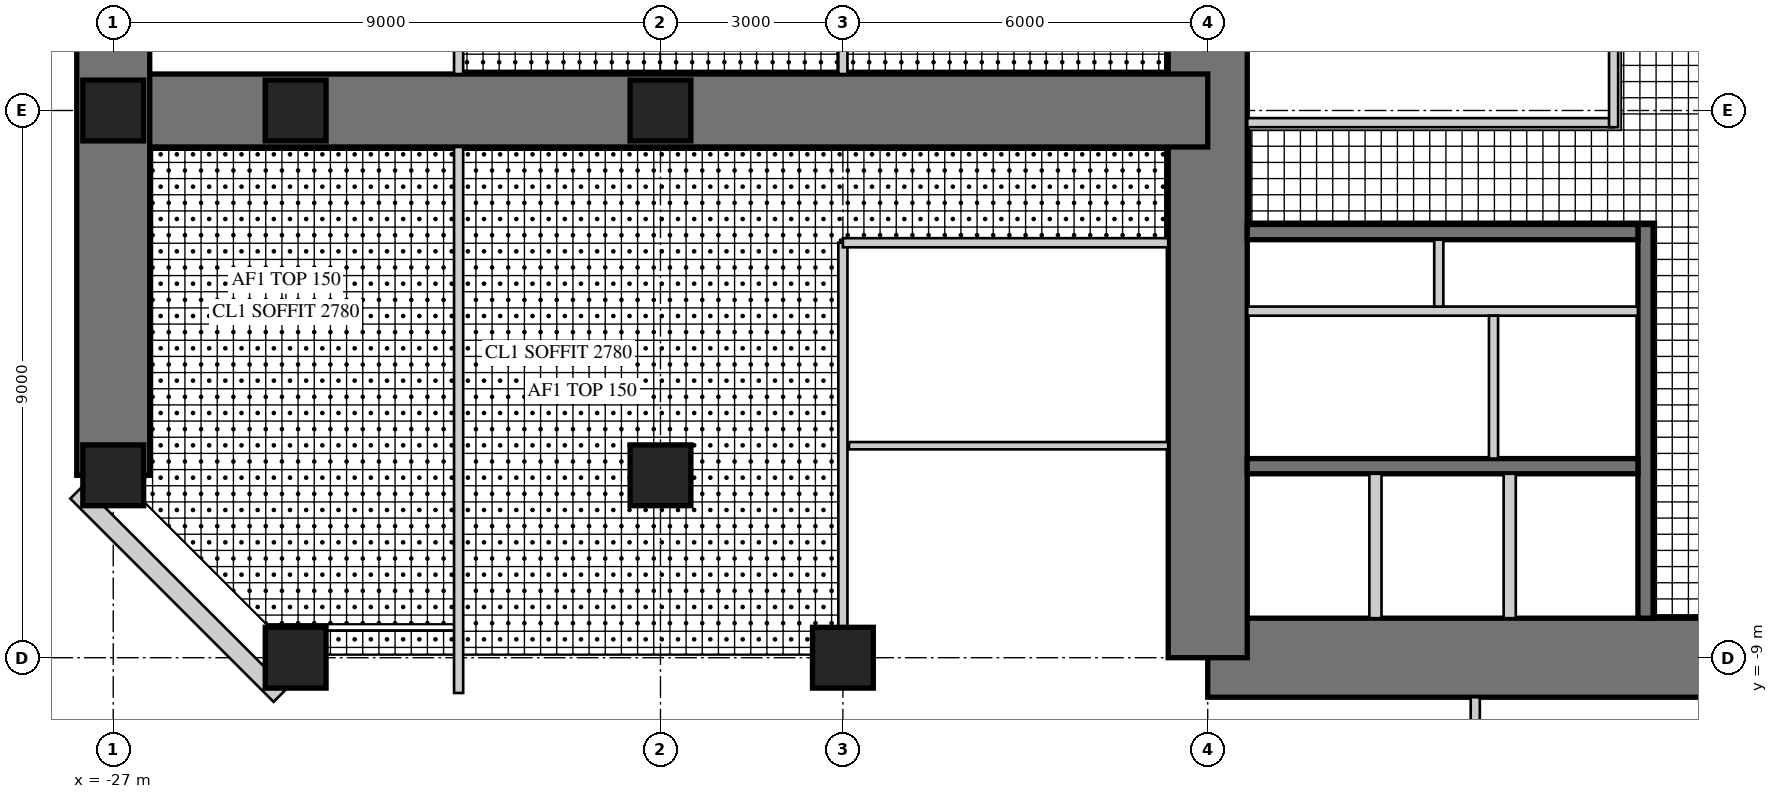
"""IFC4 building model, lengths in metres.
Left out: names, types, materials, properties, quantities, classifications, styles, units other than length and angle.
Written with IfcOpenShell. Run it as: python <this file> out.ifc"""

import sys

from ifc_helpers import new_model, si_unit, direction, frame, frame_2d, origin, origin_2d, place, context, subcontext, project, spatial, rectangle, hollow_rectangle, extrude, element, fill, save


model = new_model("IFC4")
c1 = context("Model", 3, precision=1e-05, world=origin(), true_north=direction((0.0, 1.0)))
c2 = subcontext(c1, "Body", "Model", "MODEL_VIEW")
j1 = project(units=[si_unit("LENGTHUNIT", "METRE"), si_unit("PLANEANGLEUNIT", "RADIAN")], contexts=[c1])
p1 = place(None, origin())
s1 = spatial("IfcSite", under=j1, at=p1, CompositionType="ELEMENT")
p2 = place(p1, origin())
s2 = spatial("IfcBuilding", under=s1, at=p2, CompositionType="ELEMENT")
p3 = place(p2, frame((0.0, 0.0, 152.5)))
s3 = spatial("IfcBuildingStorey", under=s2, at=p3, CompositionType="ELEMENT", Elevation=152.5)
p4 = place(p3, frame((-9.0, -9.0, 0.0), z_axis=(0.0, 0.0, 1.0), x_axis=(1.0, 0.0, 0.0)))
e1 = element("IfcWall", 1, at=p4, inside=s3, PredefinedType="SHEAR", context=c2, shape_type="SweptSolid", body=[
    extrude(rectangle(XDim=18.0, YDim=1.3, at=frame_2d((9.0, 0.0))), origin(), (0.0, 0.0, 1.0), 4.0),
])
p5 = place(p4, frame((9.8, 0.0, 0.0)))
e2 = element("IfcOpeningElement", 2, at=p5, cuts=e1, PredefinedType="OPENING", context=c2, shape_type="SweptSolid", body=[
    extrude(rectangle(XDim=1.0, YDim=2.4, at=frame_2d((0.5, 1.2))), frame((0.0, 0.66, 0.0), z_axis=(0.0, -1.0, 0.0), x_axis=(1.0, 0.0, 0.0)), (0.0, 0.0, 1.0), 1.32),
])
p6 = place(p3, frame((-9.0, 9.0, 0.0), z_axis=(0.0, 0.0, 1.0), x_axis=(0.0, -1.0, 0.0)))
e3 = element("IfcWall", 3, at=p6, inside=s3, PredefinedType="SHEAR", context=c2, shape_type="SweptSolid", body=[
    extrude(rectangle(XDim=18.0, YDim=1.3, at=frame_2d((9.0, 0.0))), origin(), (0.0, 0.0, 1.0), 4.0),
])
p7 = place(p6, frame((9.8, 0.0, 0.0)))
e4 = element("IfcOpeningElement", 4, at=p7, cuts=e3, PredefinedType="OPENING", context=c2, shape_type="SweptSolid", body=[
    extrude(rectangle(XDim=1.0, YDim=2.4, at=frame_2d((0.5, 1.2))), frame((0.0, 0.66, 0.0), z_axis=(0.0, -1.0, 0.0), x_axis=(1.0, 0.0, 0.0)), (0.0, 0.0, 1.0), 1.32),
])
p8 = place(p3, frame((-1.8, -1.875, 0.0), z_axis=(0.0, 0.0, 1.0), x_axis=(0.0, -1.0, 0.0)))
e5 = element("IfcWall", 5, at=p8, inside=s3, PredefinedType="SHEAR", context=c2, shape_type="SweptSolid", body=[
    extrude(rectangle(XDim=6.475, YDim=0.25, at=frame_2d((3.238, 0.0))), origin(), (0.0, 0.0, 1.0), 4.0),
])
p9 = place(p8, frame((1.875, 0.0, 0.0)))
e6 = element("IfcOpeningElement", 6, at=p9, cuts=e5, PredefinedType="OPENING", context=c2, shape_type="SweptSolid", body=[
    extrude(rectangle(XDim=1.6, YDim=2.4, at=frame_2d((0.8, 1.2))), frame((0.0, 0.135, 0.0), z_axis=(0.0, -1.0, 0.0), x_axis=(1.0, 0.0, 0.0)), (0.0, 0.0, 1.0), 0.27),
])
for number, where, z_axis, x_axis in (
    (7, (-1.925, -2.0, 0.0), (0.0, 0.0, 1.0), (-1.0, 0.0, 0.0)),
    (8, (-1.925, -5.85, 0.0), (0.0, 0.0, 1.0), (-1.0, 0.0, 0.0)),
):
    element("IfcWall", number, at=place(p3, frame(where, z_axis=z_axis, x_axis=x_axis)), inside=s3, PredefinedType="SHEAR", context=c2, shape_type="SweptSolid", body=[
        extrude(rectangle(XDim=6.425, YDim=0.25, at=frame_2d((3.212, 0.0))), origin(), (0.0, 0.0, 1.0), 4.0),
    ])
p10 = place(p3, frame((-1.925, -3.3, 0.0), z_axis=(0.0, 0.0, 1.0), x_axis=(-1.0, 0.0, 0.0)))
e9 = element("IfcWall", 9, at=p10, inside=s3, PredefinedType="PARTITIONING", context=c2, shape_type="SweptSolid", body=[
    extrude(rectangle(XDim=6.425, YDim=0.15, at=frame_2d((3.212, 0.0))), origin(), (0.0, 0.0, 1.0), 4.0),
])
p11 = place(p10, frame((0.075, 0.0, 0.0)))
e10 = element("IfcOpeningElement", 10, at=p11, cuts=e9, PredefinedType="OPENING", context=c2, shape_type="SweptSolid", body=[
    extrude(rectangle(XDim=0.8, YDim=2.1, at=frame_2d((0.4, 1.05))), frame((0.0, 0.085, 0.0), z_axis=(0.0, -1.0, 0.0), x_axis=(1.0, 0.0, 0.0)), (0.0, 0.0, 1.0), 0.17),
])
p12 = place(p10, frame((3.675, 0.0, 0.0)))
e11 = element("IfcOpeningElement", 11, at=p12, cuts=e9, PredefinedType="OPENING", context=c2, shape_type="SweptSolid", body=[
    extrude(rectangle(XDim=0.8, YDim=2.1, at=frame_2d((0.4, 1.05))), frame((0.0, 0.085, 0.0), z_axis=(0.0, -1.0, 0.0), x_axis=(1.0, 0.0, 0.0)), (0.0, 0.0, 1.0), 0.17),
])
p13 = place(p3, frame((-5.2, -2.125, 0.0), z_axis=(0.0, 0.0, 1.0), x_axis=(0.0, -1.0, 0.0)))
e12 = element("IfcWall", 12, at=p13, inside=s3, PredefinedType="PARTITIONING", context=c2, shape_type="SweptSolid", body=[
    extrude(rectangle(XDim=1.1, YDim=0.15, at=frame_2d((0.55, 0.0))), origin(), (0.0, 0.0, 1.0), 4.0),
])
for number, where, z_axis, x_axis in (
    (13, (-4.033, -5.975, 0.0), (0.0, 0.0, 1.0), (0.0, -1.0, 0.0)),
    (14, (-6.242, -5.975, 0.0), (0.0, 0.0, 1.0), (0.0, -1.0, 0.0)),
):
    element("IfcWall", number, at=place(p3, frame(where, z_axis=z_axis, x_axis=x_axis)), inside=s3, PredefinedType="PARTITIONING", context=c2, shape_type="SweptSolid", body=[
        extrude(rectangle(XDim=2.375, YDim=0.2, at=frame_2d((1.188, 0.0))), origin(), (0.0, 0.0, 1.0), 4.0),
    ])
p14 = place(p3, frame((-9.0, 0.0, 0.0), z_axis=(0.0, 0.0, 1.0), x_axis=(-1.0, 0.0, 0.0)))
e15 = element("IfcWall", 15, at=p14, inside=s3, PredefinedType="SHEAR", context=c2, shape_type="SweptSolid", body=[
    extrude(rectangle(XDim=18.0, YDim=1.2, at=frame_2d((9.0, 0.0))), origin(), (0.0, 0.0, 1.0), 4.0),
])
p15 = place(p14, frame((9.8, 0.0, 0.0)))
e16 = element("IfcOpeningElement", 16, at=p15, cuts=e15, PredefinedType="OPENING", context=c2, shape_type="SweptSolid", body=[
    extrude(rectangle(XDim=1.0, YDim=2.2, at=frame_2d((0.5, 1.1))), frame((0.0, 0.61, 0.0), z_axis=(0.0, -1.0, 0.0), x_axis=(1.0, 0.0, 0.0)), (0.0, 0.0, 1.0), 1.22),
])
p16 = place(p3, frame((-27.0, 6.0, 0.0), z_axis=(0.0, 0.0, 1.0), x_axis=(0.0, -1.0, 0.0)))
e17 = element("IfcWall", 17, at=p16, inside=s3, PredefinedType="SHEAR", context=c2, shape_type="SweptSolid", body=[
    extrude(rectangle(XDim=12.0, YDim=1.2, at=frame_2d((6.0, 0.0))), origin(), (0.0, 0.0, 1.0), 4.0),
])
p17 = place(p16, frame((1.55, 0.0, 0.6)))
e18 = element("IfcOpeningElement", 18, at=p17, cuts=e17, PredefinedType="OPENING", context=c2, shape_type="SweptSolid", body=[
    extrude(rectangle(XDim=3.0, YDim=2.4, at=frame_2d((1.5, 1.2))), frame((0.0, 0.61, 0.0), z_axis=(0.0, -1.0, 0.0), x_axis=(1.0, 0.0, 0.0)), (0.0, 0.0, 1.0), 1.22),
])
p18 = place(p16, frame((7.45, 0.0, 0.6)))
e19 = element("IfcOpeningElement", 19, at=p18, cuts=e17, PredefinedType="OPENING", context=c2, shape_type="SweptSolid", body=[
    extrude(rectangle(XDim=3.0, YDim=2.4, at=frame_2d((1.5, 1.2))), frame((0.0, 0.61, 0.0), z_axis=(0.0, -1.0, 0.0), x_axis=(1.0, 0.0, 0.0)), (0.0, 0.0, 1.0), 1.22),
])
for number, where, z_axis, x_axis in (
    (20, (-15.0, -9.0, 0.0), (0.0, 0.0, 1.0), (1.0, 0.0, 0.0)),
    (21, (-24.0, -9.0, 0.0), (0.0, 0.0, 1.0), (1.0, 0.0, 0.0)),
    (22, (-27.0, 0.0, 0.0), (0.0, 0.0, 1.0), (1.0, 0.0, 0.0)),
    (23, (-27.0, -6.0, 0.0), (0.0, 0.0, 1.0), (1.0, 0.0, 0.0)),
    (24, (-18.0, 0.0, 0.0), (0.0, 0.0, 1.0), (1.0, 0.0, 0.0)),
    (25, (-18.0, -6.0, 0.0), (0.0, 0.0, 1.0), (1.0, 0.0, 0.0)),
    (26, (-24.0, 0.0, 0.0), (0.0, 0.0, 1.0), (1.0, 0.0, 0.0)),
):
    element("IfcColumn", number, at=place(p3, frame(where, z_axis=z_axis, x_axis=x_axis)), inside=s3, PredefinedType="COLUMN", context=c2, shape_type="SweptSolid", body=[
        extrude(rectangle(XDim=1.0, YDim=1.0, at=origin_2d()), origin(), (0.0, 0.0, 1.0), 4.0),
    ])
p19 = place(p3, frame((-27.6, -6.277, 0.0), z_axis=(0.0, 0.0, 1.0), x_axis=(0.707106781187, -0.707106781187, 0.0)))
e27 = element("IfcWall", 27, at=p19, inside=s3, PredefinedType="SOLIDWALL", context=c2, shape_type="SweptSolid", body=[
    extrude(rectangle(XDim=4.728, YDim=0.3, at=frame_2d((2.364, 0.0))), origin(), (0.0, 0.0, 1.0), 3.8),
])
p20 = place(p19, frame((1.914, 0.0, 0.3)))
e28 = element("IfcOpeningElement", 28, at=p20, cuts=e27, PredefinedType="OPENING", context=c2, shape_type="SweptSolid", body=[
    extrude(rectangle(XDim=0.9, YDim=2.4, at=frame_2d((0.45, 1.2))), frame((0.0, 0.16, 0.0), z_axis=(0.0, -1.0, 0.0), x_axis=(1.0, 0.0, 0.0)), (0.0, 0.0, 1.0), 0.32),
])
p21 = place(p3, frame((-2.325, -0.2, 0.0), z_axis=(0.0, 0.0, 1.0), x_axis=(-1.0, 0.0, 0.0)))
e29 = element("IfcWall", 29, at=p21, inside=s3, PredefinedType="PARTITIONING", context=c2, shape_type="SweptSolid", body=[
    extrude(rectangle(XDim=6.025, YDim=0.15, at=frame_2d((3.013, 0.0))), origin(), (0.0, 0.0, 1.0), 3.8),
])
p22 = place(p21, frame((0.4, 0.0, 0.0)))
e30 = element("IfcOpeningElement", 30, at=p22, cuts=e29, PredefinedType="OPENING", context=c2, shape_type="SweptSolid", body=[
    extrude(rectangle(XDim=1.0, YDim=2.1, at=frame_2d((0.5, 1.05))), frame((0.0, 0.085, 0.0), z_axis=(0.0, -1.0, 0.0), x_axis=(1.0, 0.0, 0.0)), (0.0, 0.0, 1.0), 0.17),
])
p23 = place(p3, frame((-2.325, 1.675, 0.0), z_axis=(0.0, 0.0, 1.0), x_axis=(0.0, -1.0, 0.0)))
e31 = element("IfcWall", 31, at=p23, inside=s3, PredefinedType="PARTITIONING", context=c2, shape_type="SweptSolid", body=[
    extrude(rectangle(XDim=1.95, YDim=0.15, at=frame_2d((0.975, 0.0))), origin(), (0.0, 0.0, 1.0), 3.8),
])
p24 = place(p3, frame((-4.3, -3.375, 0.0), z_axis=(0.0, 0.0, 1.0), x_axis=(0.0, -1.0, 0.0)))
e32 = element("IfcWall", 32, at=p24, inside=s3, PredefinedType="PARTITIONING", context=c2, shape_type="SweptSolid", body=[
    extrude(rectangle(XDim=2.35, YDim=0.15, at=frame_2d((1.175, 0.0))), origin(), (0.0, 0.0, 1.0), 3.8),
])
p25 = place(p24, frame((0.45, 0.0, 0.0)))
e33 = element("IfcOpeningElement", 33, at=p25, cuts=e32, PredefinedType="OPENING", context=c2, shape_type="SweptSolid", body=[
    extrude(rectangle(XDim=1.0, YDim=2.1, at=frame_2d((0.5, 1.05))), frame((0.0, 0.085, 0.0), z_axis=(0.0, -1.0, 0.0), x_axis=(1.0, 0.0, 0.0)), (0.0, 0.0, 1.0), 0.17),
])
p26 = place(p3, frame((-4.6, -9.65, 0.0), z_axis=(0.0, 0.0, 1.0), x_axis=(0.0, -1.0, 0.0)))
e34 = element("IfcWall", 34, at=p26, inside=s3, PredefinedType="PARTITIONING", context=c2, shape_type="SweptSolid", body=[
    extrude(rectangle(XDim=5.25, YDim=0.15, at=frame_2d((2.625, 0.0))), origin(), (0.0, 0.0, 1.0), 3.8),
])
p27 = place(p3, frame((-15.0, -2.175, 0.0), z_axis=(0.0, 0.0, 1.0), x_axis=(0.0, -1.0, 0.0)))
e35 = element("IfcWall", 35, at=p27, inside=s3, PredefinedType="PARTITIONING", context=c2, shape_type="SweptSolid", body=[
    extrude(rectangle(XDim=6.325, YDim=0.15, at=frame_2d((3.163, 0.0))), origin(), (0.0, 0.0, 1.0), 3.0),
])
p28 = place(p27, frame((1.169, 0.0, 0.0)))
e36 = element("IfcOpeningElement", 36, at=p28, cuts=e35, PredefinedType="OPENING", context=c2, shape_type="SweptSolid", body=[
    extrude(rectangle(XDim=1.0, YDim=2.1, at=frame_2d((0.5, 1.05))), frame((0.0, 0.085, 0.0), z_axis=(0.0, -1.0, 0.0), x_axis=(1.0, 0.0, 0.0)), (0.0, 0.0, 1.0), 0.17),
])
p29 = place(p27, frame((4.332, 0.0, 0.0)))
e37 = element("IfcOpeningElement", 37, at=p29, cuts=e35, PredefinedType="OPENING", context=c2, shape_type="SweptSolid", body=[
    extrude(rectangle(XDim=1.0, YDim=2.1, at=frame_2d((0.5, 1.05))), frame((0.0, 0.085, 0.0), z_axis=(0.0, -1.0, 0.0), x_axis=(1.0, 0.0, 0.0)), (0.0, 0.0, 1.0), 0.17),
])
p30 = place(p3, frame((-9.65, -2.175, 0.0), z_axis=(0.0, 0.0, 1.0), x_axis=(-1.0, 0.0, 0.0)))
e38 = element("IfcWall", 38, at=p30, inside=s3, PredefinedType="PARTITIONING", context=c2, shape_type="SweptSolid", body=[
    extrude(rectangle(XDim=5.35, YDim=0.15, at=frame_2d((2.675, 0.0))), origin(), (0.0, 0.0, 1.0), 3.8),
])
p31 = place(p3, frame((-9.65, -5.513, 0.0), z_axis=(0.0, 0.0, 1.0), x_axis=(-1.0, 0.0, 0.0)))
e39 = element("IfcWall", 39, at=p31, inside=s3, PredefinedType="PLUMBINGWALL", context=c2, shape_type="SweptSolid", body=[
    extrude(rectangle(XDim=5.25, YDim=0.12, at=frame_2d((2.625, 0.0))), origin(), (0.0, 0.0, 1.0), 3.8),
])
p32 = place(p3, frame((-15.0, 8.5, 0.0), z_axis=(0.0, 0.0, 1.0), x_axis=(0.0, -1.0, 0.0)))
e40 = element("IfcWall", 40, at=p32, inside=s3, PredefinedType="PARTITIONING", context=c2, shape_type="SweptSolid", body=[
    extrude(rectangle(XDim=7.9, YDim=0.15, at=frame_2d((3.95, 0.0))), origin(), (0.0, 0.0, 1.0), 3.0),
])
p33 = place(p32, frame((3.45, 0.0, 0.0)))
e41 = element("IfcOpeningElement", 41, at=p33, cuts=e40, PredefinedType="OPENING", context=c2, shape_type="SweptSolid", body=[
    extrude(rectangle(XDim=1.0, YDim=2.1, at=frame_2d((0.5, 1.05))), frame((0.0, 0.085, 0.0), z_axis=(0.0, -1.0, 0.0), x_axis=(1.0, 0.0, 0.0)), (0.0, 0.0, 1.0), 0.17),
])
p34 = place(p3, frame((-21.32, -0.6, 0.0), z_axis=(0.0, 0.0, 1.0), x_axis=(0.0, -1.0, 0.0)))
e42 = element("IfcWall", 42, at=p34, inside=s3, PredefinedType="PARTITIONING", context=c2, shape_type="SweptSolid", body=[
    extrude(rectangle(XDim=8.98, YDim=0.15, at=frame_2d((4.49, 0.0))), origin(), (0.0, 0.0, 1.0), 3.8),
])
p35 = place(p34, frame((0.45, 0.0, 0.0)))
e43 = element("IfcOpeningElement", 43, at=p35, cuts=e42, PredefinedType="OPENING", context=c2, shape_type="SweptSolid", body=[
    extrude(rectangle(XDim=1.0, YDim=2.2, at=frame_2d((0.5, 1.1))), frame((0.0, 0.085, 0.0), z_axis=(0.0, -1.0, 0.0), x_axis=(1.0, 0.0, 0.0)), (0.0, 0.0, 1.0), 0.17),
])
p36 = place(p3, frame((-21.32, 9.58, 0.0), z_axis=(0.0, 0.0, 1.0), x_axis=(0.0, -1.0, 0.0)))
e44 = element("IfcWall", 44, at=p36, inside=s3, PredefinedType="PARTITIONING", context=c2, shape_type="SweptSolid", body=[
    extrude(rectangle(XDim=8.98, YDim=0.15, at=frame_2d((4.49, 0.0))), origin(), (0.0, 0.0, 1.0), 3.8),
])
p37 = place(p36, frame((4.987, 0.0, 0.0)))
e45 = element("IfcOpeningElement", 45, at=p37, cuts=e44, PredefinedType="OPENING", context=c2, shape_type="SweptSolid", body=[
    extrude(rectangle(XDim=1.0, YDim=2.2, at=frame_2d((0.5, 1.1))), frame((0.0, 0.085, 0.0), z_axis=(0.0, -1.0, 0.0), x_axis=(1.0, 0.0, 0.0)), (0.0, 0.0, 1.0), 0.17),
])
p38 = place(p36, frame((7.63, 0.0, 0.0)))
e46 = element("IfcOpeningElement", 46, at=p38, cuts=e44, PredefinedType="OPENING", context=c2, shape_type="SweptSolid", body=[
    extrude(rectangle(XDim=1.0, YDim=2.2, at=frame_2d((0.5, 1.1))), frame((0.0, 0.085, 0.0), z_axis=(0.0, -1.0, 0.0), x_axis=(1.0, 0.0, 0.0)), (0.0, 0.0, 1.0), 0.17),
])
p39 = place(p18, origin())
e47 = element("IfcWindow", 47, at=p39, inside=s3, PartitioningType="SINGLE_PANEL", PredefinedType="WINDOW", context=c2, shape_type="SweptSolid", body=[
    extrude(hollow_rectangle(XDim=3.0, YDim=2.4, WallThickness=0.06, at=frame_2d((1.5, 1.2))), frame((0.0, 0.03, 0.0), z_axis=(0.0, -1.0, 0.0), x_axis=(1.0, 0.0, 0.0)), (0.0, 0.0, 1.0), 0.06),
    extrude(rectangle(XDim=2.879, YDim=2.279, at=frame_2d((1.5, 1.2))), frame((0.0, 0.03, 0.0), z_axis=(0.0, -1.0, 0.0), x_axis=(1.0, 0.0, 0.0)), (0.0, 0.0, 1.0), 0.06),
])
fill(e19, e47)
p40 = place(p20, origin())
e48 = element("IfcWindow", 48, at=p40, inside=s3, PartitioningType="SINGLE_PANEL", PredefinedType="WINDOW", context=c2, shape_type="SweptSolid", body=[
    extrude(hollow_rectangle(XDim=0.9, YDim=2.4, WallThickness=0.06, at=frame_2d((0.45, 1.2))), frame((0.0, 0.03, 0.0), z_axis=(0.0, -1.0, 0.0), x_axis=(1.0, 0.0, 0.0)), (0.0, 0.0, 1.0), 0.06),
    extrude(rectangle(XDim=0.779, YDim=2.279, at=frame_2d((0.45, 1.2))), frame((0.0, 0.03, 0.0), z_axis=(0.0, -1.0, 0.0), x_axis=(1.0, 0.0, 0.0)), (0.0, 0.0, 1.0), 0.06),
])
fill(e28, e48)
p41 = place(p22, frame((1.0, 0.0, 0.0), z_axis=(0.0, 0.0, 1.0), x_axis=(-1.0, 0.0, 0.0)))
e49 = element("IfcDoor", 49, at=p41, inside=s3, OperationType="SINGLE_SWING_RIGHT", PredefinedType="DOOR", context=c2, shape_type="SweptSolid", body=[
    extrude(rectangle(XDim=1.0, YDim=2.1, at=frame_2d((0.5, 1.05))), frame((0.0, 0.025, 0.0), z_axis=(0.0, -1.0, 0.0), x_axis=(1.0, 0.0, 0.0)), (0.0, 0.0, 1.0), 0.05),
])
fill(e30, e49)
p42 = place(p25, origin())
e50 = element("IfcDoor", 50, at=p42, inside=s3, OperationType="SINGLE_SWING_LEFT", PredefinedType="DOOR", context=c2, shape_type="SweptSolid", body=[
    extrude(rectangle(XDim=1.0, YDim=2.1, at=frame_2d((0.5, 1.05))), frame((0.0, 0.025, 0.0), z_axis=(0.0, -1.0, 0.0), x_axis=(1.0, 0.0, 0.0)), (0.0, 0.0, 1.0), 0.05),
])
fill(e33, e50)
p43 = place(p28, origin())
e51 = element("IfcDoor", 51, at=p43, inside=s3, OperationType="SINGLE_SWING_LEFT", PredefinedType="DOOR", context=c2, shape_type="SweptSolid", body=[
    extrude(rectangle(XDim=1.0, YDim=2.1, at=frame_2d((0.5, 1.05))), frame((0.0, 0.025, 0.0), z_axis=(0.0, -1.0, 0.0), x_axis=(1.0, 0.0, 0.0)), (0.0, 0.0, 1.0), 0.05),
])
fill(e36, e51)
p44 = place(p29, origin())
e52 = element("IfcDoor", 52, at=p44, inside=s3, OperationType="SINGLE_SWING_LEFT", PredefinedType="DOOR", context=c2, shape_type="SweptSolid", body=[
    extrude(rectangle(XDim=1.0, YDim=2.1, at=frame_2d((0.5, 1.05))), frame((0.0, 0.025, 0.0), z_axis=(0.0, -1.0, 0.0), x_axis=(1.0, 0.0, 0.0)), (0.0, 0.0, 1.0), 0.05),
])
fill(e37, e52)
p45 = place(p35, frame((1.0, 0.0, 0.0), z_axis=(0.0, 0.0, 1.0), x_axis=(-1.0, 0.0, 0.0)))
e53 = element("IfcDoor", 53, at=p45, inside=s3, OperationType="SINGLE_SWING_RIGHT", PredefinedType="DOOR", context=c2, shape_type="SweptSolid", body=[
    extrude(rectangle(XDim=1.0, YDim=2.2, at=frame_2d((0.5, 1.1))), frame((0.0, 0.025, 0.0), z_axis=(0.0, -1.0, 0.0), x_axis=(1.0, 0.0, 0.0)), (0.0, 0.0, 1.0), 0.05),
])
fill(e43, e53)
p46 = place(p38, frame((1.0, 0.0, 0.0), z_axis=(0.0, 0.0, 1.0), x_axis=(-1.0, 0.0, 0.0)))
e54 = element("IfcDoor", 54, at=p46, inside=s3, OperationType="SINGLE_SWING_LEFT", PredefinedType="DOOR", context=c2, shape_type="SweptSolid", body=[
    extrude(rectangle(XDim=1.0, YDim=2.2, at=frame_2d((0.5, 1.1))), frame((0.0, 0.025, 0.0), z_axis=(0.0, -1.0, 0.0), x_axis=(1.0, 0.0, 0.0)), (0.0, 0.0, 1.0), 0.05),
])
fill(e46, e54)
p47 = place(p15, frame((1.0, 0.0, 0.0), z_axis=(0.0, 0.0, 1.0), x_axis=(-1.0, 0.0, 0.0)))
e55 = element("IfcDoor", 55, at=p47, inside=s3, OperationType="SINGLE_SWING_LEFT", PredefinedType="DOOR", context=c2, shape_type="SweptSolid", body=[
    extrude(rectangle(XDim=1.0, YDim=2.2, at=frame_2d((0.5, 1.1))), frame((0.0, 0.025, 0.0), z_axis=(0.0, -1.0, 0.0), x_axis=(1.0, 0.0, 0.0)), (0.0, 0.0, 1.0), 0.05),
])
fill(e16, e55)
p48 = place(p7, frame((1.0, 0.0, 0.0), z_axis=(0.0, 0.0, 1.0), x_axis=(-1.0, 0.0, 0.0)))
e56 = element("IfcDoor", 56, at=p48, inside=s3, OperationType="SINGLE_SWING_RIGHT", PredefinedType="DOOR", context=c2, shape_type="SweptSolid", body=[
    extrude(rectangle(XDim=1.0, YDim=2.4, at=frame_2d((0.5, 1.2))), frame((0.0, -0.005, 0.0), z_axis=(0.0, -1.0, 0.0), x_axis=(1.0, 0.0, 0.0)), (0.0, 0.0, 1.0), 0.05),
])
fill(e4, e56)
p49 = place(p9, frame((1.6, 0.0, 0.0), z_axis=(0.0, 0.0, 1.0), x_axis=(-1.0, 0.0, 0.0)))
e57 = element("IfcDoor", 57, at=p49, inside=s3, OperationType="DOUBLE_DOOR_SINGLE_SWING", PredefinedType="DOOR", context=c2, shape_type="SweptSolid", body=[
    extrude(rectangle(XDim=1.6, YDim=2.4, at=frame_2d((0.8, 1.2))), frame((0.0, 0.025, 0.0), z_axis=(0.0, -1.0, 0.0), x_axis=(1.0, 0.0, 0.0)), (0.0, 0.0, 1.0), 0.05),
])
fill(e6, e57)
p50 = place(p11, frame((0.8, 0.0, 0.0), z_axis=(0.0, 0.0, 1.0), x_axis=(-1.0, 0.0, 0.0)))
e58 = element("IfcDoor", 58, at=p50, inside=s3, OperationType="SINGLE_SWING_RIGHT", PredefinedType="DOOR", context=c2, shape_type="SweptSolid", body=[
    extrude(rectangle(XDim=0.8, YDim=2.1, at=frame_2d((0.4, 1.05))), frame((0.0, 0.025, 0.0), z_axis=(0.0, -1.0, 0.0), x_axis=(1.0, 0.0, 0.0)), (0.0, 0.0, 1.0), 0.05),
])
fill(e10, e58)
p51 = place(p12, frame((0.8, 0.0, 0.0), z_axis=(0.0, 0.0, 1.0), x_axis=(-1.0, 0.0, 0.0)))
e59 = element("IfcDoor", 59, at=p51, inside=s3, OperationType="SINGLE_SWING_RIGHT", PredefinedType="DOOR", context=c2, shape_type="SweptSolid", body=[
    extrude(rectangle(XDim=0.8, YDim=2.1, at=frame_2d((0.4, 1.05))), frame((0.0, 0.025, 0.0), z_axis=(0.0, -1.0, 0.0), x_axis=(1.0, 0.0, 0.0)), (0.0, 0.0, 1.0), 0.05),
])
fill(e11, e59)
save(model, sys.argv[1])
